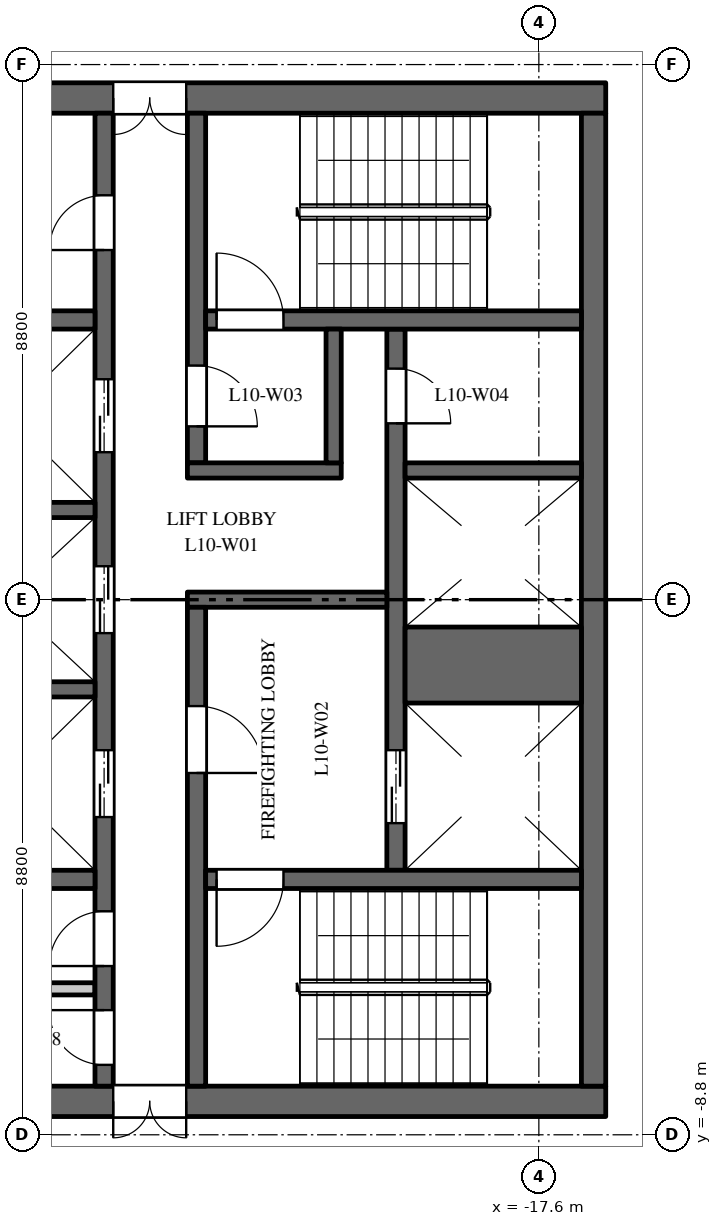
"""IFC4 building model, lengths in metres.
Left out: names, types, materials, properties, quantities, classifications, styles, units other than length and angle.
Written with IfcOpenShell. Run it as: python <this file> out.ifc"""

import sys

from ifc_helpers import new_model, si_unit, direction, frame, frame_2d, origin, place, context, subcontext, project, spatial, rectangle, extrude, element, fill, save


model = new_model("IFC4")
c1 = context("Model", 3, precision=1e-05, world=origin(), true_north=direction((0.0, 1.0)))
c2 = subcontext(c1, "Body", "Model", "MODEL_VIEW")
j1 = project(units=[si_unit("LENGTHUNIT", "METRE"), si_unit("PLANEANGLEUNIT", "RADIAN")], contexts=[c1])
p1 = place(None, origin())
s1 = spatial("IfcSite", under=j1, at=p1, CompositionType="ELEMENT")
p2 = place(p1, origin())
s2 = spatial("IfcBuilding", under=s1, at=p2, CompositionType="ELEMENT")
p3 = place(p2, frame((0.0, 0.0, 50.5)))
s3 = spatial("IfcBuildingStorey", under=s2, at=p3, CompositionType="ELEMENT", Elevation=50.5)
p4 = place(p3, frame((-16.5, 8.25, 0.0), z_axis=(0.0, 0.0, 1.0), x_axis=(-1.0, 0.0, 0.0)))
e1 = element("IfcWall", 1, at=p4, inside=s3, PredefinedType="SHEAR", context=c2, shape_type="SweptSolid", body=[
    extrude(rectangle(XDim=15.0, YDim=0.5, at=frame_2d((7.5, 0.0))), origin(), (0.0, 0.0, 1.0), 3.7),
])
p5 = place(p4, frame((6.9, 0.0, 0.0)))
e2 = element("IfcOpeningElement", 2, at=p5, cuts=e1, PredefinedType="OPENING", context=c2, shape_type="SweptSolid", body=[
    extrude(rectangle(XDim=1.2, YDim=2.1, at=frame_2d((0.6, 1.05))), frame((0.0, 0.26, 0.0), z_axis=(0.0, -1.0, 0.0), x_axis=(1.0, 0.0, 0.0)), (0.0, 0.0, 1.0), 0.52),
])
p6 = place(p4, frame((12.425, 0.0, 0.0)))
e3 = element("IfcOpeningElement", 3, at=p6, cuts=e1, PredefinedType="OPENING", context=c2, shape_type="SweptSolid", body=[
    extrude(rectangle(XDim=0.9, YDim=2.1, at=frame_2d((0.45, 1.05))), frame((0.0, 0.26, 0.0), z_axis=(0.0, -1.0, 0.0), x_axis=(1.0, 0.0, 0.0)), (0.0, 0.0, 1.0), 0.52),
])
p7 = place(p3, frame((-16.5, -8.25, 0.0), z_axis=(0.0, 0.0, 1.0), x_axis=(-1.0, 0.0, 0.0)))
e4 = element("IfcWall", 4, at=p7, inside=s3, PredefinedType="SHEAR", context=c2, shape_type="SweptSolid", body=[
    extrude(rectangle(XDim=15.0, YDim=0.5, at=frame_2d((7.5, 0.0))), origin(), (0.0, 0.0, 1.0), 3.7),
])
p8 = place(p7, frame((6.9, 0.0, 0.0)))
e5 = element("IfcOpeningElement", 5, at=p8, cuts=e4, PredefinedType="OPENING", context=c2, shape_type="SweptSolid", body=[
    extrude(rectangle(XDim=1.2, YDim=2.1, at=frame_2d((0.6, 1.05))), frame((0.0, 0.26, 0.0), z_axis=(0.0, -1.0, 0.0), x_axis=(1.0, 0.0, 0.0)), (0.0, 0.0, 1.0), 0.52),
])
p9 = place(p7, frame((12.275, 0.0, 0.0)))
e6 = element("IfcOpeningElement", 6, at=p9, cuts=e4, PredefinedType="OPENING", context=c2, shape_type="SweptSolid", body=[
    extrude(rectangle(XDim=0.9, YDim=2.1, at=frame_2d((0.45, 1.05))), frame((0.0, 0.26, 0.0), z_axis=(0.0, -1.0, 0.0), x_axis=(1.0, 0.0, 0.0)), (0.0, 0.0, 1.0), 0.52),
])
p10 = place(p3, frame((-19.95, -4.45, 0.0), z_axis=(0.0, 0.0, 1.0), x_axis=(0.0, 1.0, 0.0)))
e7 = element("IfcWall", 7, at=p10, inside=s3, PredefinedType="SHEAR", context=c2, shape_type="SweptSolid", body=[
    extrude(rectangle(XDim=8.9, YDim=0.3, at=frame_2d((4.45, 0.0))), origin(), (0.0, 0.0, 1.0), 3.7),
])
p11 = place(p10, frame((0.775, 0.0, 0.0)))
e8 = element("IfcOpeningElement", 8, at=p11, cuts=e7, PredefinedType="OPENING", context=c2, shape_type="SweptSolid", body=[
    extrude(rectangle(XDim=1.2, YDim=2.1, at=frame_2d((0.6, 1.05))), frame((0.0, 0.16, 0.0), z_axis=(0.0, -1.0, 0.0), x_axis=(1.0, 0.0, 0.0)), (0.0, 0.0, 1.0), 0.32),
])
p12 = place(p10, frame((7.35, 0.0, 0.0)))
e9 = element("IfcOpeningElement", 9, at=p12, cuts=e7, PredefinedType="OPENING", context=c2, shape_type="SweptSolid", body=[
    extrude(rectangle(XDim=0.9, YDim=2.1, at=frame_2d((0.45, 1.05))), frame((0.0, 0.16, 0.0), z_axis=(0.0, -1.0, 0.0), x_axis=(1.0, 0.0, 0.0)), (0.0, 0.0, 1.0), 0.32),
])
p13 = place(p3, frame((-24.75, -8.0, 0.0), z_axis=(0.0, 0.0, 1.0), x_axis=(0.0, 1.0, 0.0)))
e10 = element("IfcWall", 10, at=p13, inside=s3, PredefinedType="SHEAR", context=c2, shape_type="SweptSolid", body=[
    extrude(rectangle(XDim=16.0, YDim=0.3, at=frame_2d((8.0, 0.0))), origin(), (0.0, 0.0, 1.0), 3.7),
])
p14 = place(p13, frame((4.425, 0.0, 0.0)))
e11 = element("IfcOpeningElement", 11, at=p14, cuts=e10, PredefinedType="OPENING", context=c2, shape_type="SweptSolid", body=[
    extrude(rectangle(XDim=1.1, YDim=2.1, at=frame_2d((0.55, 1.05))), frame((0.0, 0.16, 0.0), z_axis=(0.0, -1.0, 0.0), x_axis=(1.0, 0.0, 0.0)), (0.0, 0.0, 1.0), 0.32),
])
p15 = place(p13, frame((7.45, 0.0, 0.0)))
e12 = element("IfcOpeningElement", 12, at=p15, cuts=e10, PredefinedType="OPENING", context=c2, shape_type="SweptSolid", body=[
    extrude(rectangle(XDim=1.1, YDim=2.1, at=frame_2d((0.55, 1.05))), frame((0.0, 0.16, 0.0), z_axis=(0.0, -1.0, 0.0), x_axis=(1.0, 0.0, 0.0)), (0.0, 0.0, 1.0), 0.32),
])
p16 = place(p13, frame((10.425, 0.0, 0.0)))
e13 = element("IfcOpeningElement", 13, at=p16, cuts=e10, PredefinedType="OPENING", context=c2, shape_type="SweptSolid", body=[
    extrude(rectangle(XDim=1.2, YDim=2.1, at=frame_2d((0.6, 1.05))), frame((0.0, 0.16, 0.0), z_axis=(0.0, -1.0, 0.0), x_axis=(1.0, 0.0, 0.0)), (0.0, 0.0, 1.0), 0.32),
])
p17 = place(p13, frame((13.75, 0.0, 0.0)))
e14 = element("IfcOpeningElement", 14, at=p17, cuts=e10, PredefinedType="OPENING", context=c2, shape_type="SweptSolid", body=[
    extrude(rectangle(XDim=0.9, YDim=2.1, at=frame_2d((0.45, 1.05))), frame((0.0, 0.16, 0.0), z_axis=(0.0, -1.0, 0.0), x_axis=(1.0, 0.0, 0.0)), (0.0, 0.0, 1.0), 0.32),
])
p18 = place(p13, frame((1.975, 0.0, 0.0)))
e15 = element("IfcOpeningElement", 15, at=p18, cuts=e10, PredefinedType="OPENING", context=c2, shape_type="SweptSolid", body=[
    extrude(rectangle(XDim=0.9, YDim=2.1, at=frame_2d((0.45, 1.05))), frame((0.0, 0.16, 0.0), z_axis=(0.0, -1.0, 0.0), x_axis=(1.0, 0.0, 0.0)), (0.0, 0.0, 1.0), 0.32),
])
p19 = place(p13, frame((0.35, 0.0, 0.0)))
e16 = element("IfcOpeningElement", 16, at=p19, cuts=e10, PredefinedType="OPENING", context=c2, shape_type="SweptSolid", body=[
    extrude(rectangle(XDim=0.9, YDim=2.1, at=frame_2d((0.45, 1.05))), frame((0.0, 0.16, 0.0), z_axis=(0.0, -1.0, 0.0), x_axis=(1.0, 0.0, 0.0)), (0.0, 0.0, 1.0), 0.32),
])
p20 = place(p3, frame((-20.1, 0.0, 0.0), z_axis=(0.0, 0.0, 1.0), x_axis=(-1.0, 0.0, 0.0)))
e17 = element("IfcWall", 17, at=p20, inside=s3, PredefinedType="SHEAR", context=c2, shape_type="SweptSolid", body=[
    extrude(rectangle(XDim=3.28, YDim=0.25, at=frame_2d((1.64, 0.0))), origin(), (0.0, 0.0, 1.0), 3.7),
])
p21 = place(p3, frame((-16.7, -8.0, 0.0), z_axis=(0.0, 0.0, 1.0), x_axis=(0.0, 1.0, 0.0)))
e18 = element("IfcWall", 18, at=p21, inside=s3, PredefinedType="SHEAR", context=c2, shape_type="SweptSolid", body=[
    extrude(rectangle(XDim=16.0, YDim=0.4, at=frame_2d((8.0, 0.0))), origin(), (0.0, 0.0, 1.0), 3.7),
])
p22 = place(p3, frame((-24.9, 4.6, 0.0), z_axis=(0.0, 0.0, 1.0), x_axis=(-1.0, 0.0, 0.0)))
e19 = element("IfcWall", 19, at=p22, inside=s3, PredefinedType="SHEAR", context=c2, shape_type="SweptSolid", body=[
    extrude(rectangle(XDim=6.1, YDim=0.3, at=frame_2d((3.05, 0.0))), origin(), (0.0, 0.0, 1.0), 3.7),
])
p23 = place(p22, frame((4.2, 0.0, 0.0)))
e20 = element("IfcOpeningElement", 20, at=p23, cuts=e19, PredefinedType="OPENING", context=c2, shape_type="SweptSolid", body=[
    extrude(rectangle(XDim=0.9, YDim=2.1, at=frame_2d((0.45, 1.05))), frame((0.0, 0.16, 0.0), z_axis=(0.0, -1.0, 0.0), x_axis=(1.0, 0.0, 0.0)), (0.0, 0.0, 1.0), 0.32),
])
p24 = place(p3, frame((-24.9, -6.4, 0.0), z_axis=(0.0, 0.0, 1.0), x_axis=(-1.0, 0.0, 0.0)))
e21 = element("IfcWall", 21, at=p24, inside=s3, PredefinedType="PARTITIONING", context=c2, shape_type="SweptSolid", body=[
    extrude(rectangle(XDim=2.35, YDim=0.2, at=frame_2d((1.175, 0.0))), origin(), (0.0, 0.0, 1.0), 3.7),
])
p25 = place(p3, frame((-24.9, -4.6, 0.0), z_axis=(0.0, 0.0, 1.0), x_axis=(-1.0, 0.0, 0.0)))
e22 = element("IfcWall", 22, at=p25, inside=s3, PredefinedType="SHEAR", context=c2, shape_type="SweptSolid", body=[
    extrude(rectangle(XDim=6.1, YDim=0.3, at=frame_2d((3.05, 0.0))), origin(), (0.0, 0.0, 1.0), 3.7),
])
p26 = place(p3, frame((-16.9, -1.075, 0.0), z_axis=(0.0, 0.0, 1.0), x_axis=(-1.0, 0.0, 0.0)))
e23 = element("IfcWall", 23, at=p26, inside=s3, PredefinedType="SHEAR", context=c2, shape_type="SweptSolid", body=[
    extrude(rectangle(XDim=2.9, YDim=1.25, at=frame_2d((1.45, 0.0))), origin(), (0.0, 0.0, 1.0), 3.7),
])
for number, where, z_axis, x_axis in (
    (24, (-16.9, 2.125, 0.0), (0.0, 0.0, 1.0), (-1.0, 0.0, 0.0)),
    (25, (-24.9, -1.475, 0.0), (0.0, 0.0, 1.0), (-1.0, 0.0, 0.0)),
    (26, (-24.9, 1.475, 0.0), (0.0, 0.0, 1.0), (-1.0, 0.0, 0.0)),
):
    element("IfcWall", number, at=place(p3, frame(where, z_axis=z_axis, x_axis=x_axis)), inside=s3, PredefinedType="SHEAR", context=c2, shape_type="SweptSolid", body=[
        extrude(rectangle(XDim=2.9, YDim=0.25, at=frame_2d((1.45, 0.0))), origin(), (0.0, 0.0, 1.0), 3.7),
    ])
p27 = place(p3, frame((-23.23, 2.25, 0.0), z_axis=(0.0, 0.0, 1.0), x_axis=(0.0, 1.0, 0.0)))
e27 = element("IfcWall", 27, at=p27, inside=s3, PredefinedType="SHEAR", context=c2, shape_type="SweptSolid", body=[
    extrude(rectangle(XDim=5.75, YDim=0.3, at=frame_2d((2.875, 0.0))), origin(), (0.0, 0.0, 1.0), 3.7),
])
p28 = place(p27, frame((0.6, 0.0, 0.0)))
e28 = element("IfcOpeningElement", 28, at=p28, cuts=e27, PredefinedType="OPENING", context=c2, shape_type="SweptSolid", body=[
    extrude(rectangle(XDim=1.0, YDim=2.1, at=frame_2d((0.5, 1.05))), frame((0.0, 0.16, 0.0), z_axis=(0.0, -1.0, 0.0), x_axis=(1.0, 0.0, 0.0)), (0.0, 0.0, 1.0), 0.32),
])
p29 = place(p3, frame((-23.23, -8.0, 0.0), z_axis=(0.0, 0.0, 1.0), x_axis=(0.0, 1.0, 0.0)))
e29 = element("IfcWall", 29, at=p29, inside=s3, PredefinedType="SHEAR", context=c2, shape_type="SweptSolid", body=[
    extrude(rectangle(XDim=7.875, YDim=0.3, at=frame_2d((3.938, 0.0))), origin(), (0.0, 0.0, 1.0), 3.7),
])
p30 = place(p29, frame((5.15, 0.0, 0.0)))
e30 = element("IfcOpeningElement", 30, at=p30, cuts=e29, PredefinedType="OPENING", context=c2, shape_type="SweptSolid", body=[
    extrude(rectangle(XDim=1.1, YDim=2.1, at=frame_2d((0.55, 1.05))), frame((0.0, 0.16, 0.0), z_axis=(0.0, -1.0, 0.0), x_axis=(1.0, 0.0, 0.0)), (0.0, 0.0, 1.0), 0.32),
])
p31 = place(p3, frame((-16.9, 4.6, 0.0), z_axis=(0.0, 0.0, 1.0), x_axis=(-1.0, 0.0, 0.0)))
e31 = element("IfcWall", 31, at=p31, inside=s3, PredefinedType="SHEAR", context=c2, shape_type="SweptSolid", body=[
    extrude(rectangle(XDim=6.18, YDim=0.3, at=frame_2d((3.09, 0.0))), origin(), (0.0, 0.0, 1.0), 3.7),
])
p32 = place(p31, frame((4.9, 0.0, 0.0)))
e32 = element("IfcOpeningElement", 32, at=p32, cuts=e31, PredefinedType="OPENING", context=c2, shape_type="SweptSolid", body=[
    extrude(rectangle(XDim=1.1, YDim=2.1, at=frame_2d((0.55, 1.05))), frame((0.0, 0.16, 0.0), z_axis=(0.0, -1.0, 0.0), x_axis=(1.0, 0.0, 0.0)), (0.0, 0.0, 1.0), 0.32),
])
p33 = place(p3, frame((-16.9, -4.6, 0.0), z_axis=(0.0, 0.0, 1.0), x_axis=(-1.0, 0.0, 0.0)))
e33 = element("IfcWall", 33, at=p33, inside=s3, PredefinedType="SHEAR", context=c2, shape_type="SweptSolid", body=[
    extrude(rectangle(XDim=6.18, YDim=0.3, at=frame_2d((3.09, 0.0))), origin(), (0.0, 0.0, 1.0), 3.7),
])
p34 = place(p33, frame((4.9, 0.0, 0.0)))
e34 = element("IfcOpeningElement", 34, at=p34, cuts=e33, PredefinedType="OPENING", context=c2, shape_type="SweptSolid", body=[
    extrude(rectangle(XDim=1.1, YDim=2.1, at=frame_2d((0.55, 1.05))), frame((0.0, 0.16, 0.0), z_axis=(0.0, -1.0, 0.0), x_axis=(1.0, 0.0, 0.0)), (0.0, 0.0, 1.0), 0.32),
])
p35 = place(p3, frame((-20.85, 2.125, 0.0), z_axis=(0.0, 0.0, 1.0), x_axis=(-1.0, 0.0, 0.0)))
e35 = element("IfcWall", 35, at=p35, inside=s3, PredefinedType="SHEAR", context=c2, shape_type="SweptSolid", body=[
    extrude(rectangle(XDim=2.53, YDim=0.25, at=frame_2d((1.265, 0.0))), origin(), (0.0, 0.0, 1.0), 3.7),
])
p36 = place(p3, frame((-20.975, 2.25, 0.0), z_axis=(0.0, 0.0, 1.0), x_axis=(0.0, 1.0, 0.0)))
e36 = element("IfcWall", 36, at=p36, inside=s3, PredefinedType="SHEAR", context=c2, shape_type="SweptSolid", body=[
    extrude(rectangle(XDim=2.2, YDim=0.25, at=frame_2d((1.1, 0.0))), origin(), (0.0, 0.0, 1.0), 3.7),
])
p37 = place(p11, origin())
e37 = element("IfcDoor", 37, at=p37, inside=s3, OperationType="DOUBLE_DOOR_SLIDING", PredefinedType="DOOR", context=c2, shape_type="SweptSolid", body=[
    extrude(rectangle(XDim=1.2, YDim=2.1, at=frame_2d((0.6, 1.05))), frame((0.0, 0.025, 0.0), z_axis=(0.0, -1.0, 0.0), x_axis=(1.0, 0.0, 0.0)), (0.0, 0.0, 1.0), 0.05),
])
fill(e8, e37)
p38 = place(p14, origin())
e38 = element("IfcDoor", 38, at=p38, inside=s3, OperationType="DOUBLE_DOOR_SLIDING", PredefinedType="DOOR", context=c2, shape_type="SweptSolid", body=[
    extrude(rectangle(XDim=1.1, YDim=2.1, at=frame_2d((0.55, 1.05))), frame((0.0, 0.025, 0.0), z_axis=(0.0, -1.0, 0.0), x_axis=(1.0, 0.0, 0.0)), (0.0, 0.0, 1.0), 0.05),
])
fill(e11, e38)
p39 = place(p15, origin())
e39 = element("IfcDoor", 39, at=p39, inside=s3, OperationType="DOUBLE_DOOR_SLIDING", PredefinedType="DOOR", context=c2, shape_type="SweptSolid", body=[
    extrude(rectangle(XDim=1.1, YDim=2.1, at=frame_2d((0.55, 1.05))), frame((0.0, 0.025, 0.0), z_axis=(0.0, -1.0, 0.0), x_axis=(1.0, 0.0, 0.0)), (0.0, 0.0, 1.0), 0.05),
])
fill(e12, e39)
p40 = place(p16, origin())
e40 = element("IfcDoor", 40, at=p40, inside=s3, OperationType="DOUBLE_DOOR_SLIDING", PredefinedType="DOOR", context=c2, shape_type="SweptSolid", body=[
    extrude(rectangle(XDim=1.2, YDim=2.1, at=frame_2d((0.6, 1.05))), frame((0.0, 0.025, 0.0), z_axis=(0.0, -1.0, 0.0), x_axis=(1.0, 0.0, 0.0)), (0.0, 0.0, 1.0), 0.05),
])
fill(e13, e40)
p41 = place(p32, origin())
e41 = element("IfcDoor", 41, at=p41, inside=s3, OperationType="SINGLE_SWING_RIGHT", PredefinedType="DOOR", context=c2, shape_type="SweptSolid", body=[
    extrude(rectangle(XDim=1.1, YDim=2.1, at=frame_2d((0.55, 1.05))), frame((0.0, 0.025, 0.0), z_axis=(0.0, -1.0, 0.0), x_axis=(1.0, 0.0, 0.0)), (0.0, 0.0, 1.0), 0.05),
])
fill(e32, e41)
p42 = place(p34, origin())
e42 = element("IfcDoor", 42, at=p42, inside=s3, OperationType="SINGLE_SWING_LEFT", PredefinedType="DOOR", context=c2, shape_type="SweptSolid", body=[
    extrude(rectangle(XDim=1.1, YDim=2.1, at=frame_2d((0.55, 1.05))), frame((0.0, 0.025, 0.0), z_axis=(0.0, -1.0, 0.0), x_axis=(1.0, 0.0, 0.0)), (0.0, 0.0, 1.0), 0.05),
])
fill(e34, e42)
p43 = place(p30, origin())
e43 = element("IfcDoor", 43, at=p43, inside=s3, OperationType="SINGLE_SWING_LEFT", PredefinedType="DOOR", context=c2, shape_type="SweptSolid", body=[
    extrude(rectangle(XDim=1.1, YDim=2.1, at=frame_2d((0.55, 1.05))), frame((0.0, 0.025, 0.0), z_axis=(0.0, -1.0, 0.0), x_axis=(1.0, 0.0, 0.0)), (0.0, 0.0, 1.0), 0.05),
])
fill(e30, e43)
p44 = place(p28, origin())
e44 = element("IfcDoor", 44, at=p44, inside=s3, OperationType="SINGLE_SWING_LEFT", PredefinedType="DOOR", context=c2, shape_type="SweptSolid", body=[
    extrude(rectangle(XDim=1.0, YDim=2.1, at=frame_2d((0.5, 1.05))), frame((0.0, 0.025, 0.0), z_axis=(0.0, -1.0, 0.0), x_axis=(1.0, 0.0, 0.0)), (0.0, 0.0, 1.0), 0.05),
])
fill(e28, e44)
p45 = place(p5, origin())
e45 = element("IfcDoor", 45, at=p45, inside=s3, OperationType="DOUBLE_DOOR_DOUBLE_SWING", PredefinedType="DOOR", context=c2, shape_type="SweptSolid", body=[
    extrude(rectangle(XDim=1.2, YDim=2.1, at=frame_2d((0.6, 1.05))), frame((0.0, 0.025, 0.0), z_axis=(0.0, -1.0, 0.0), x_axis=(1.0, 0.0, 0.0)), (0.0, 0.0, 1.0), 0.05),
])
fill(e2, e45)
p46 = place(p8, origin())
e46 = element("IfcDoor", 46, at=p46, inside=s3, OperationType="DOUBLE_DOOR_DOUBLE_SWING", PredefinedType="DOOR", context=c2, shape_type="SweptSolid", body=[
    extrude(rectangle(XDim=1.2, YDim=2.1, at=frame_2d((0.6, 1.05))), frame((0.0, 0.025, 0.0), z_axis=(0.0, -1.0, 0.0), x_axis=(1.0, 0.0, 0.0)), (0.0, 0.0, 1.0), 0.05),
])
fill(e5, e46)
p47 = place(p12, origin())
e47 = element("IfcDoor", 47, at=p47, inside=s3, OperationType="SINGLE_SWING_LEFT", PredefinedType="DOOR", context=c2, shape_type="SweptSolid", body=[
    extrude(rectangle(XDim=0.9, YDim=2.1, at=frame_2d((0.45, 1.05))), frame((0.0, 0.025, 0.0), z_axis=(0.0, -1.0, 0.0), x_axis=(1.0, 0.0, 0.0)), (0.0, 0.0, 1.0), 0.05),
])
fill(e9, e47)
p48 = place(p17, origin())
e48 = element("IfcDoor", 48, at=p48, inside=s3, OperationType="SINGLE_SWING_RIGHT", PredefinedType="DOOR", context=c2, shape_type="SweptSolid", body=[
    extrude(rectangle(XDim=0.9, YDim=2.1, at=frame_2d((0.45, 1.05))), frame((0.0, 0.025, 0.0), z_axis=(0.0, -1.0, 0.0), x_axis=(1.0, 0.0, 0.0)), (0.0, 0.0, 1.0), 0.05),
])
fill(e14, e48)
p49 = place(p18, origin())
e49 = element("IfcDoor", 49, at=p49, inside=s3, OperationType="SINGLE_SWING_RIGHT", PredefinedType="DOOR", context=c2, shape_type="SweptSolid", body=[
    extrude(rectangle(XDim=0.9, YDim=2.1, at=frame_2d((0.45, 1.05))), frame((0.0, 0.025, 0.0), z_axis=(0.0, -1.0, 0.0), x_axis=(1.0, 0.0, 0.0)), (0.0, 0.0, 1.0), 0.05),
])
fill(e15, e49)
p50 = place(p19, origin())
e50 = element("IfcDoor", 50, at=p50, inside=s3, OperationType="SINGLE_SWING_LEFT", PredefinedType="DOOR", context=c2, shape_type="SweptSolid", body=[
    extrude(rectangle(XDim=0.9, YDim=2.1, at=frame_2d((0.45, 1.05))), frame((0.0, 0.025, 0.0), z_axis=(0.0, -1.0, 0.0), x_axis=(1.0, 0.0, 0.0)), (0.0, 0.0, 1.0), 0.05),
])
fill(e16, e50)
save(model, sys.argv[1])
